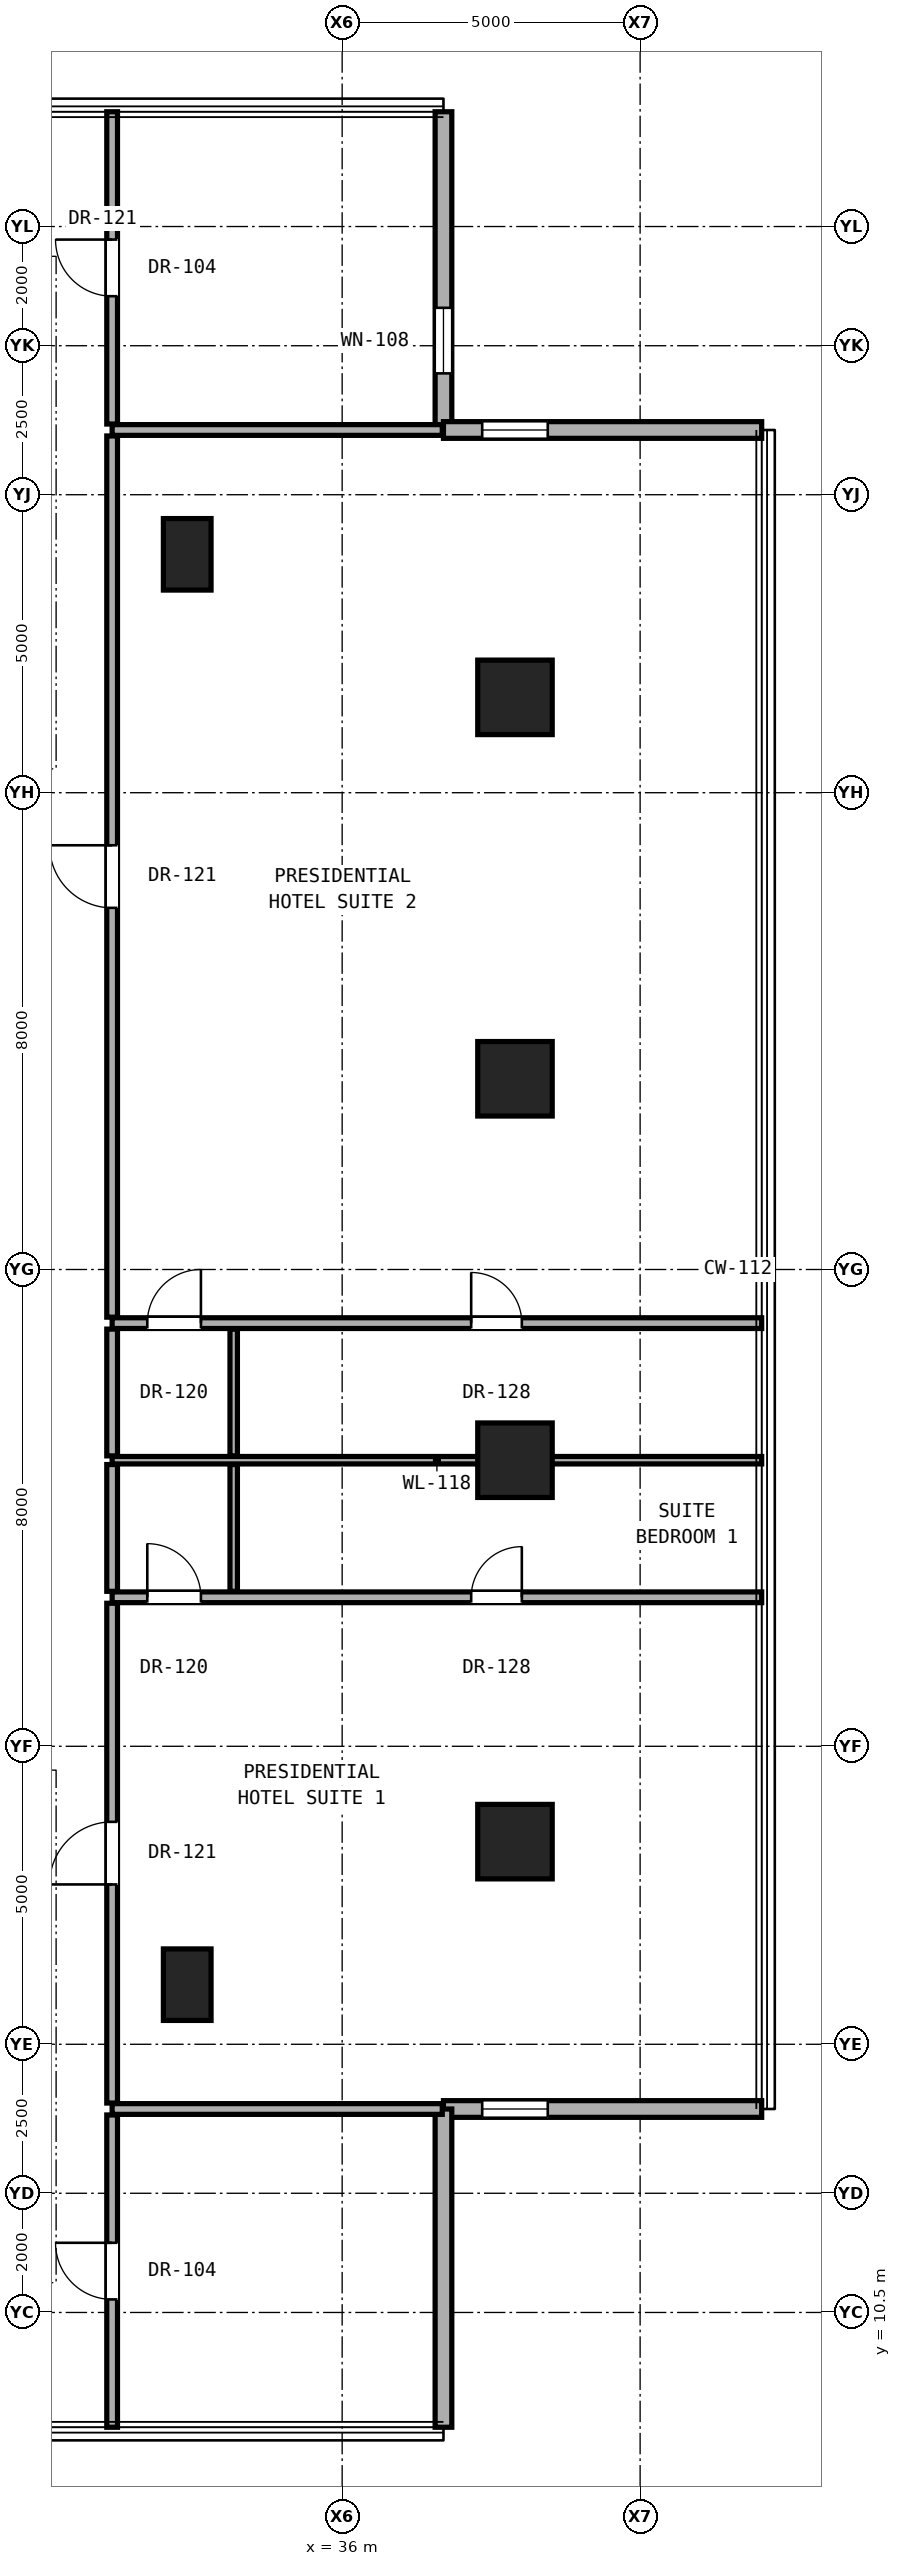
"""IFC4 building model, lengths in metres.
Left out: names, types, materials, properties, quantities, classifications, styles, units other than length and angle.
Written with IfcOpenShell. Run it as: python <this file> out.ifc"""

import sys

from ifc_helpers import new_model, si_unit, direction, frame, frame_2d, origin, origin_2d, place, context, subcontext, project, spatial, rectangle, hollow_rectangle, extrude, element, fill, save


model = new_model("IFC4")
c1 = context("Model", 3, precision=1e-05, world=origin(), true_north=direction((0.0, 1.0)))
c2 = subcontext(c1, "Body", "Model", "MODEL_VIEW")
j1 = project(units=[si_unit("LENGTHUNIT", "METRE"), si_unit("PLANEANGLEUNIT", "RADIAN")], contexts=[c1])
p1 = place(None, origin())
s1 = spatial("IfcSite", under=j1, at=p1, CompositionType="ELEMENT")
p2 = place(p1, origin())
s2 = spatial("IfcBuilding", under=s1, at=p2, CompositionType="ELEMENT")
p3 = place(p2, frame((0.0, 0.0, 75.2)))
s3 = spatial("IfcBuildingStorey", under=s2, at=p3, CompositionType="ELEMENT", Elevation=75.2)
for number, where, z_axis, x_axis in (
    (1, (38.9, 18.4, 0.0), (0.0, 0.0, 1.0), (1.0, 0.0, 0.0)),
    (2, (38.9, 24.8, 0.0), (0.0, 0.0, 1.0), (1.0, 0.0, 0.0)),
    (3, (38.9, 31.2, 0.0), (0.0, 0.0, 1.0), (1.0, 0.0, 0.0)),
    (4, (38.9, 37.6, 0.0), (0.0, 0.0, 1.0), (1.0, 0.0, 0.0)),
):
    element("IfcColumn", number, at=place(p3, frame(where, z_axis=z_axis, x_axis=x_axis)), inside=s3, PredefinedType="COLUMN", context=c2, shape_type="SweptSolid", body=[
        extrude(hollow_rectangle(XDim=1.25, YDim=1.25, WallThickness=0.07, at=origin_2d()), origin(), (0.0, 0.0, 1.0), 3.3),
    ])
for number, where, z_axis, x_axis in (
    (5, (33.4, 16.0, 0.0), (0.0, 0.0, 1.0), (1.0, 0.0, 0.0)),
    (6, (33.4, 40.0, 0.0), (0.0, 0.0, 1.0), (1.0, 0.0, 0.0)),
):
    element("IfcColumn", number, at=place(p3, frame(where, z_axis=z_axis, x_axis=x_axis)), inside=s3, PredefinedType="PILASTER", context=c2, shape_type="SweptSolid", body=[
        extrude(rectangle(XDim=0.8, YDim=1.2, at=origin_2d()), origin(), (0.0, 0.0, 1.0), 3.3),
    ])
p4 = place(p3, frame((37.7, 42.086, 0.0), z_axis=(0.0, 0.0, 1.0), x_axis=(0.0, 1.0, 0.0)))
e7 = element("IfcWall", 7, at=p4, inside=s3, PredefinedType="SOLIDWALL", context=c2, shape_type="SweptSolid", body=[
    extrude(rectangle(XDim=5.34, YDim=0.28, at=frame_2d((2.67, 0.0))), origin(), (0.0, 0.0, 1.0), 3.04),
])
p5 = place(p4, frame((0.95, 0.0, 0.85)))
e8 = element("IfcOpeningElement", 8, at=p5, cuts=e7, PredefinedType="OPENING", context=c2, shape_type="SweptSolid", body=[
    extrude(rectangle(XDim=1.1, YDim=2.0, at=frame_2d((0.55, 1.0))), frame((0.0, 0.15, 0.0), z_axis=(0.0, -1.0, 0.0), x_axis=(1.0, 0.0, 0.0)), (0.0, 0.0, 1.0), 0.3),
])
p6 = place(p3, frame((37.7, 13.914, 0.0), z_axis=(0.0, 0.0, 1.0), x_axis=(1.0, 0.0, 0.0)))
e9 = element("IfcWall", 9, at=p6, inside=s3, PredefinedType="SOLIDWALL", context=c2, shape_type="SweptSolid", body=[
    extrude(rectangle(XDim=5.34, YDim=0.28, at=frame_2d((2.67, 0.0))), origin(), (0.0, 0.0, 1.0), 3.04),
])
p7 = place(p6, frame((0.65, 0.0, 0.85)))
e10 = element("IfcOpeningElement", 10, at=p7, cuts=e9, PredefinedType="OPENING", context=c2, shape_type="SweptSolid", body=[
    extrude(rectangle(XDim=1.1, YDim=2.0, at=frame_2d((0.55, 1.0))), frame((0.0, 0.15, 0.0), z_axis=(0.0, -1.0, 0.0), x_axis=(1.0, 0.0, 0.0)), (0.0, 0.0, 1.0), 0.3),
])
p8 = place(p3, frame((37.7, 8.574, 0.0), z_axis=(0.0, 0.0, 1.0), x_axis=(0.0, 1.0, 0.0)))
e11 = element("IfcWall", 11, at=p8, inside=s3, PredefinedType="SOLIDWALL", context=c2, shape_type="SweptSolid", body=[
    extrude(rectangle(XDim=5.34, YDim=0.28, at=frame_2d((2.67, 0.0))), origin(), (0.0, 0.0, 1.0), 3.04),
])
p9 = place(p3, frame((43.04, 42.086, 0.0), z_axis=(0.0, 0.0, 1.0), x_axis=(-1.0, 0.0, 0.0)))
e12 = element("IfcWall", 12, at=p9, inside=s3, PredefinedType="SOLIDWALL", context=c2, shape_type="SweptSolid", body=[
    extrude(rectangle(XDim=5.34, YDim=0.28, at=frame_2d((2.67, 0.0))), origin(), (0.0, 0.0, 1.0), 3.04),
])
p10 = place(p9, frame((3.59, 0.0, 0.85)))
e13 = element("IfcOpeningElement", 13, at=p10, cuts=e12, PredefinedType="OPENING", context=c2, shape_type="SweptSolid", body=[
    extrude(rectangle(XDim=1.1, YDim=2.0, at=frame_2d((0.55, 1.0))), frame((0.0, 0.15, 0.0), z_axis=(0.0, -1.0, 0.0), x_axis=(1.0, 0.0, 0.0)), (0.0, 0.0, 1.0), 0.3),
])
p11 = place(p3, frame((32.14, 13.914, 0.0), z_axis=(0.0, 0.0, 1.0), x_axis=(1.0, 0.0, 0.0)))
e14 = element("IfcWall", 14, at=p11, inside=s3, PredefinedType="PARTITIONING", context=c2, shape_type="SweptSolid", body=[
    extrude(rectangle(XDim=5.54, YDim=0.18, at=frame_2d((2.77, 0.0))), origin(), (0.0, 0.0, 1.0), 3.06),
])
p12 = place(p3, frame((32.14, 22.5, 0.0), z_axis=(0.0, 0.0, 1.0), x_axis=(1.0, 0.0, 0.0)))
e15 = element("IfcWall", 15, at=p12, inside=s3, PredefinedType="PARTITIONING", context=c2, shape_type="SweptSolid", body=[
    extrude(rectangle(XDim=10.9, YDim=0.18, at=frame_2d((5.45, 0.0))), origin(), (0.0, 0.0, 1.0), 2.125),
])
p13 = place(p12, frame((6.025, 0.0, 0.0)))
e16 = element("IfcOpeningElement", 16, at=p13, cuts=e15, PredefinedType="OPENING", context=c2, shape_type="SweptSolid", body=[
    extrude(rectangle(XDim=0.85, YDim=2.01, at=frame_2d((0.425, 1.005))), frame((0.0, 0.1, 0.0), z_axis=(0.0, -1.0, 0.0), x_axis=(1.0, 0.0, 0.0)), (0.0, 0.0, 1.0), 0.2),
])
p14 = place(p12, frame((0.59, 0.0, 0.0)))
e17 = element("IfcOpeningElement", 17, at=p14, cuts=e15, PredefinedType="OPENING", context=c2, shape_type="SweptSolid", body=[
    extrude(rectangle(XDim=0.9, YDim=2.1, at=frame_2d((0.45, 1.05))), frame((0.0, 0.1, 0.0), z_axis=(0.0, -1.0, 0.0), x_axis=(1.0, 0.0, 0.0)), (0.0, 0.0, 1.0), 0.2),
])
p15 = place(p3, frame((32.14, 24.8, 0.0), z_axis=(0.0, 0.0, 1.0), x_axis=(1.0, 0.0, 0.0)))
e18 = element("IfcWall", 18, at=p15, inside=s3, PredefinedType="PARTITIONING", context=c2, shape_type="SweptSolid", body=[
    extrude(rectangle(XDim=10.9, YDim=0.125, at=frame_2d((5.45, 0.0))), origin(), (0.0, 0.0, 1.0), 2.125),
])
p16 = place(p3, frame((32.14, 27.1, 0.0), z_axis=(0.0, 0.0, 1.0), x_axis=(1.0, 0.0, 0.0)))
e19 = element("IfcWall", 19, at=p16, inside=s3, PredefinedType="PARTITIONING", context=c2, shape_type="SweptSolid", body=[
    extrude(rectangle(XDim=10.9, YDim=0.18, at=frame_2d((5.45, 0.0))), origin(), (0.0, 0.0, 1.0), 2.125),
])
p17 = place(p16, frame((6.025, 0.0, 0.0)))
e20 = element("IfcOpeningElement", 20, at=p17, cuts=e19, PredefinedType="OPENING", context=c2, shape_type="SweptSolid", body=[
    extrude(rectangle(XDim=0.85, YDim=2.01, at=frame_2d((0.425, 1.005))), frame((0.0, 0.1, 0.0), z_axis=(0.0, -1.0, 0.0), x_axis=(1.0, 0.0, 0.0)), (0.0, 0.0, 1.0), 0.2),
])
p18 = place(p16, frame((0.59, 0.0, 0.0)))
e21 = element("IfcOpeningElement", 21, at=p18, cuts=e19, PredefinedType="OPENING", context=c2, shape_type="SweptSolid", body=[
    extrude(rectangle(XDim=0.9, YDim=2.1, at=frame_2d((0.45, 1.05))), frame((0.0, 0.1, 0.0), z_axis=(0.0, -1.0, 0.0), x_axis=(1.0, 0.0, 0.0)), (0.0, 0.0, 1.0), 0.2),
])
p19 = place(p3, frame((32.14, 42.086, 0.0), z_axis=(0.0, 0.0, 1.0), x_axis=(1.0, 0.0, 0.0)))
e22 = element("IfcWall", 22, at=p19, inside=s3, PredefinedType="PARTITIONING", context=c2, shape_type="SweptSolid", body=[
    extrude(rectangle(XDim=5.54, YDim=0.18, at=frame_2d((2.77, 0.0))), origin(), (0.0, 0.0, 1.0), 3.06),
])
p20 = place(p3, frame((32.14, 8.574, 0.0), z_axis=(0.0, 0.0, 1.0), x_axis=(0.0, 1.0, 0.0)))
e23 = element("IfcWall", 23, at=p20, inside=s3, PredefinedType="PARTITIONING", context=c2, shape_type="SweptSolid", body=[
    extrude(rectangle(XDim=5.24, YDim=0.18, at=frame_2d((2.62, 0.0))), origin(), (0.0, 0.0, 1.0), 3.06),
])
p21 = place(p20, frame((2.145, 0.0, 0.0)))
e24 = element("IfcOpeningElement", 24, at=p21, cuts=e23, PredefinedType="OPENING", context=c2, shape_type="SweptSolid", body=[
    extrude(rectangle(XDim=0.95, YDim=2.15, at=frame_2d((0.475, 1.075))), frame((0.0, 0.1, 0.0), z_axis=(0.0, -1.0, 0.0), x_axis=(1.0, 0.0, 0.0)), (0.0, 0.0, 1.0), 0.2),
])
p22 = place(p3, frame((32.14, 14.014, 0.0), z_axis=(0.0, 0.0, 1.0), x_axis=(0.0, 1.0, 0.0)))
e25 = element("IfcWall", 25, at=p22, inside=s3, PredefinedType="PARTITIONING", context=c2, shape_type="SweptSolid", body=[
    extrude(rectangle(XDim=8.386, YDim=0.18, at=frame_2d((4.193, 0.0))), origin(), (0.0, 0.0, 1.0), 2.436),
])
p23 = place(p22, frame((3.668, 0.0, 0.0)))
e26 = element("IfcOpeningElement", 26, at=p23, cuts=e25, PredefinedType="OPENING", context=c2, shape_type="SweptSolid", body=[
    extrude(rectangle(XDim=1.05, YDim=2.2, at=frame_2d((0.525, 1.1))), frame((0.0, 0.1, 0.0), z_axis=(0.0, -1.0, 0.0), x_axis=(1.0, 0.0, 0.0)), (0.0, 0.0, 1.0), 0.2),
])
for number, where, z_axis, x_axis in (
    (27, (32.14, 22.6, 0.0), (0.0, 0.0, 1.0), (0.0, 1.0, 0.0)),
    (28, (32.14, 24.873, 0.0), (0.0, 0.0, 1.0), (0.0, 1.0, 0.0)),
):
    element("IfcWall", number, at=place(p3, frame(where, z_axis=z_axis, x_axis=x_axis)), inside=s3, PredefinedType="PARTITIONING", context=c2, shape_type="SweptSolid", body=[
        extrude(rectangle(XDim=2.127, YDim=0.18, at=frame_2d((1.064, 0.0))), origin(), (0.0, 0.0, 1.0), 2.279),
    ])
p24 = place(p3, frame((32.14, 27.2, 0.0), z_axis=(0.0, 0.0, 1.0), x_axis=(0.0, 1.0, 0.0)))
e29 = element("IfcWall", 29, at=p24, inside=s3, PredefinedType="PARTITIONING", context=c2, shape_type="SweptSolid", body=[
    extrude(rectangle(XDim=14.786, YDim=0.18, at=frame_2d((7.393, 0.0))), origin(), (0.0, 0.0, 1.0), 2.279),
])
p25 = place(p24, frame((6.868, 0.0, 0.0)))
e30 = element("IfcOpeningElement", 30, at=p25, cuts=e29, PredefinedType="OPENING", context=c2, shape_type="SweptSolid", body=[
    extrude(rectangle(XDim=1.05, YDim=2.2, at=frame_2d((0.525, 1.1))), frame((0.0, 0.1, 0.0), z_axis=(0.0, -1.0, 0.0), x_axis=(1.0, 0.0, 0.0)), (0.0, 0.0, 1.0), 0.2),
])
p26 = place(p3, frame((32.14, 42.186, 0.0), z_axis=(0.0, 0.0, 1.0), x_axis=(0.0, 1.0, 0.0)))
e31 = element("IfcWall", 31, at=p26, inside=s3, PredefinedType="PARTITIONING", context=c2, shape_type="SweptSolid", body=[
    extrude(rectangle(XDim=5.24, YDim=0.18, at=frame_2d((2.62, 0.0))), origin(), (0.0, 0.0, 1.0), 3.06),
])
p27 = place(p26, frame((2.145, 0.0, 0.0)))
e32 = element("IfcOpeningElement", 32, at=p27, cuts=e31, PredefinedType="OPENING", context=c2, shape_type="SweptSolid", body=[
    extrude(rectangle(XDim=0.95, YDim=2.15, at=frame_2d((0.475, 1.075))), frame((0.0, 0.1, 0.0), z_axis=(0.0, -1.0, 0.0), x_axis=(1.0, 0.0, 0.0)), (0.0, 0.0, 1.0), 0.2),
])
for number, where, z_axis, x_axis in (
    (33, (34.18, 22.6, 0.0), (0.0, 0.0, 1.0), (0.0, 1.0, 0.0)),
    (34, (34.18, 24.873, 0.0), (0.0, 0.0, 1.0), (0.0, 1.0, 0.0)),
):
    element("IfcWall", number, at=place(p3, frame(where, z_axis=z_axis, x_axis=x_axis)), inside=s3, PredefinedType="PARTITIONING", context=c2, shape_type="SweptSolid", body=[
        extrude(rectangle(XDim=2.127, YDim=0.125, at=frame_2d((1.064, 0.0))), origin(), (0.0, 0.0, 1.0), 2.279),
    ])
p28 = place(p5, origin())
e35 = element("IfcWindow", 35, at=p28, inside=s3, PartitioningType="SINGLE_PANEL", PredefinedType="WINDOW", context=c2, shape_type="SweptSolid", body=[
    extrude(rectangle(XDim=1.1, YDim=2.0, at=frame_2d((0.55, 1.0))), frame((0.0, 0.03, 0.0), z_axis=(0.0, -1.0, 0.0), x_axis=(1.0, 0.0, 0.0)), (0.0, 0.0, 1.0), 0.06),
])
fill(e8, e35)
p29 = place(p7, origin())
e36 = element("IfcWindow", 36, at=p29, inside=s3, PartitioningType="SINGLE_PANEL", PredefinedType="WINDOW", context=c2, shape_type="SweptSolid", body=[
    extrude(rectangle(XDim=1.1, YDim=2.0, at=frame_2d((0.55, 1.0))), frame((0.0, 0.03, 0.0), z_axis=(0.0, -1.0, 0.0), x_axis=(1.0, 0.0, 0.0)), (0.0, 0.0, 1.0), 0.06),
])
fill(e10, e36)
p30 = place(p10, origin())
e37 = element("IfcWindow", 37, at=p30, inside=s3, PartitioningType="SINGLE_PANEL", PredefinedType="WINDOW", context=c2, shape_type="SweptSolid", body=[
    extrude(rectangle(XDim=1.1, YDim=2.0, at=frame_2d((0.55, 1.0))), frame((0.0, 0.03, 0.0), z_axis=(0.0, -1.0, 0.0), x_axis=(1.0, 0.0, 0.0)), (0.0, 0.0, 1.0), 0.06),
])
fill(e13, e37)
p31 = place(p23, origin())
e38 = element("IfcDoor", 38, at=p31, inside=s3, OperationType="SINGLE_SWING_LEFT", PredefinedType="DOOR", context=c2, shape_type="SweptSolid", body=[
    extrude(rectangle(XDim=1.05, YDim=2.2, at=frame_2d((0.525, 1.1))), frame((0.0, 0.025, 0.0), z_axis=(0.0, -1.0, 0.0), x_axis=(1.0, 0.0, 0.0)), (0.0, 0.0, 1.0), 0.05),
])
fill(e26, e38)
p32 = place(p13, origin())
e39 = element("IfcDoor", 39, at=p32, inside=s3, OperationType="SINGLE_SWING_RIGHT", PredefinedType="DOOR", context=c2, shape_type="SweptSolid", body=[
    extrude(rectangle(XDim=0.85, YDim=2.01, at=frame_2d((0.425, 1.005))), frame((0.0, 0.025, 0.0), z_axis=(0.0, -1.0, 0.0), x_axis=(1.0, 0.0, 0.0)), (0.0, 0.0, 1.0), 0.05),
])
fill(e16, e39)
p33 = place(p14, origin())
e40 = element("IfcDoor", 40, at=p33, inside=s3, OperationType="SINGLE_SWING_LEFT", PredefinedType="DOOR", context=c2, shape_type="SweptSolid", body=[
    extrude(rectangle(XDim=0.9, YDim=2.1, at=frame_2d((0.45, 1.05))), frame((0.0, 0.025, 0.0), z_axis=(0.0, -1.0, 0.0), x_axis=(1.0, 0.0, 0.0)), (0.0, 0.0, 1.0), 0.05),
])
fill(e17, e40)
p34 = place(p25, origin())
e41 = element("IfcDoor", 41, at=p34, inside=s3, OperationType="SINGLE_SWING_RIGHT", PredefinedType="DOOR", context=c2, shape_type="SweptSolid", body=[
    extrude(rectangle(XDim=1.05, YDim=2.2, at=frame_2d((0.525, 1.1))), frame((0.0, 0.025, 0.0), z_axis=(0.0, -1.0, 0.0), x_axis=(1.0, 0.0, 0.0)), (0.0, 0.0, 1.0), 0.05),
])
fill(e30, e41)
p35 = place(p17, origin())
e42 = element("IfcDoor", 42, at=p35, inside=s3, OperationType="SINGLE_SWING_LEFT", PredefinedType="DOOR", context=c2, shape_type="SweptSolid", body=[
    extrude(rectangle(XDim=0.85, YDim=2.01, at=frame_2d((0.425, 1.005))), frame((0.0, 0.025, 0.0), z_axis=(0.0, -1.0, 0.0), x_axis=(1.0, 0.0, 0.0)), (0.0, 0.0, 1.0), 0.05),
])
fill(e20, e42)
p36 = place(p18, origin())
e43 = element("IfcDoor", 43, at=p36, inside=s3, OperationType="SINGLE_SWING_RIGHT", PredefinedType="DOOR", context=c2, shape_type="SweptSolid", body=[
    extrude(rectangle(XDim=0.9, YDim=2.1, at=frame_2d((0.45, 1.05))), frame((0.0, 0.025, 0.0), z_axis=(0.0, -1.0, 0.0), x_axis=(1.0, 0.0, 0.0)), (0.0, 0.0, 1.0), 0.05),
])
fill(e21, e43)
p37 = place(p21, origin())
e44 = element("IfcDoor", 44, at=p37, inside=s3, OperationType="SINGLE_SWING_RIGHT", PredefinedType="DOOR", context=c2, shape_type="SweptSolid", body=[
    extrude(rectangle(XDim=0.95, YDim=2.15, at=frame_2d((0.475, 1.075))), frame((0.0, 0.025, 0.0), z_axis=(0.0, -1.0, 0.0), x_axis=(1.0, 0.0, 0.0)), (0.0, 0.0, 1.0), 0.05),
])
fill(e24, e44)
p38 = place(p27, origin())
e45 = element("IfcDoor", 45, at=p38, inside=s3, OperationType="SINGLE_SWING_RIGHT", PredefinedType="DOOR", context=c2, shape_type="SweptSolid", body=[
    extrude(rectangle(XDim=0.95, YDim=2.15, at=frame_2d((0.475, 1.075))), frame((0.0, 0.025, 0.0), z_axis=(0.0, -1.0, 0.0), x_axis=(1.0, 0.0, 0.0)), (0.0, 0.0, 1.0), 0.05),
])
fill(e32, e45)
save(model, sys.argv[1])
